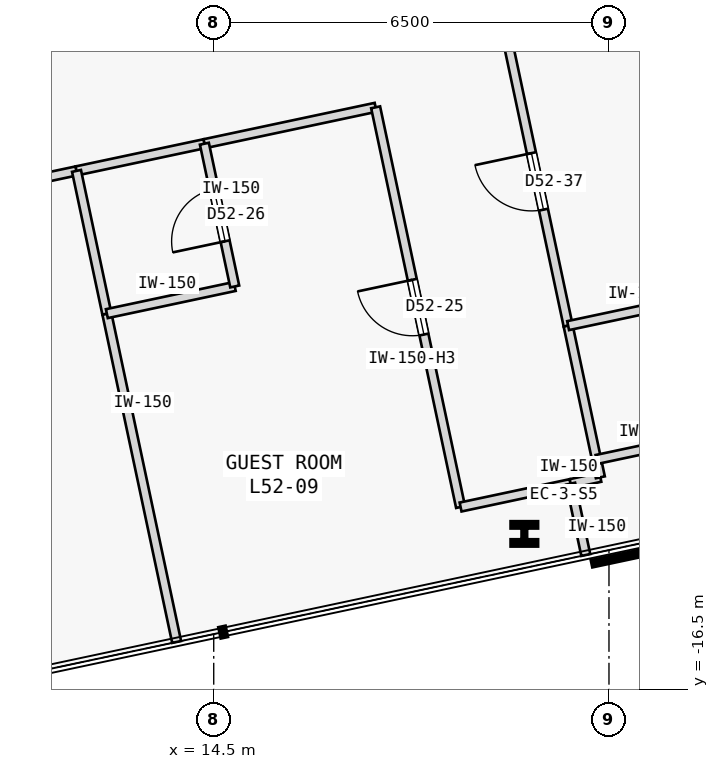
"""IFC4 building model, lengths in metres.
Left out: names, types, materials, properties, quantities, classifications, styles, units other than length and angle.
Written with IfcOpenShell. Run it as: python <this file> out.ifc"""

import sys

from ifc_helpers import new_model, si_unit, direction, frame, frame_2d, origin, origin_2d, place, context, subcontext, project, spatial, rectangle, i_section, extrude, element, fill, save


model = new_model("IFC4")
c1 = context("Model", 3, precision=1e-05, world=origin(), true_north=direction((0.0, 1.0)))
c2 = subcontext(c1, "Body", "Model", "MODEL_VIEW")
j1 = project(units=[si_unit("LENGTHUNIT", "METRE"), si_unit("PLANEANGLEUNIT", "RADIAN")], contexts=[c1])
p1 = place(None, origin())
s1 = spatial("IfcSite", under=j1, at=p1, CompositionType="ELEMENT")
p2 = place(p1, origin())
s2 = spatial("IfcBuilding", under=s1, at=p2, CompositionType="ELEMENT")
p3 = place(p2, frame((0.0, 0.0, 199.0)))
s3 = spatial("IfcBuildingStorey", under=s2, at=p3, CompositionType="ELEMENT", Elevation=199.0)
p4 = place(p3, frame((19.608, -13.94, 0.0), z_axis=(0.0, 0.0, 1.0), x_axis=(1.0, 0.0, 0.0)))
e1 = element("IfcColumn", 1, at=p4, inside=s3, PredefinedType="COLUMN", context=c2, shape_type="SweptSolid", body=[
    extrude(i_section(OverallWidth=0.409, OverallDepth=0.374, WebThickness=0.048, FlangeThickness=0.077, FilletRadius=0.015, at=origin_2d()), origin(), (0.0, 0.0, 1.0), 3.4),
])
p5 = place(p3, frame((7.618, -8.954, 0.0), z_axis=(0.0, 0.0, 1.0), x_axis=(0.978140347221, 0.207945812984, 0.0)))
e2 = element("IfcWall", 2, at=p5, inside=s3, PredefinedType="PARTITIONING", context=c2, shape_type="SweptSolid", body=[
    extrude(rectangle(XDim=4.729, YDim=0.15, at=frame_2d((2.365, 0.0))), origin(), (0.0, 0.0, 1.0), 3.0),
])
p6 = place(p5, frame((1.195, 0.0, 0.0)))
e3 = element("IfcOpeningElement", 3, at=p6, cuts=e2, PredefinedType="OPENING", context=c2, shape_type="SweptSolid", body=[
    extrude(rectangle(XDim=0.92, YDim=2.15, at=frame_2d((0.46, 1.075))), frame((0.0, 0.085, 0.0), z_axis=(0.0, -1.0, 0.0), x_axis=(1.0, 0.0, 0.0)), (0.0, 0.0, 1.0), 0.17),
])
p7 = place(p3, frame((14.346, -7.524, 0.0), z_axis=(0.0, 0.0, 1.0), x_axis=(0.97816208355, 0.207843542851, 0.0)))
e4 = element("IfcWall", 4, at=p7, inside=s3, PredefinedType="PARTITIONING", context=c2, shape_type="SweptSolid", body=[
    extrude(rectangle(XDim=2.879, YDim=0.15, at=frame_2d((1.439, 0.0))), origin(), (0.0, 0.0, 1.0), 3.0),
])
p8 = place(p3, frame((18.56, -13.498, 0.0), z_axis=(0.0, 0.0, 1.0), x_axis=(-0.207888737749, 0.978152479278, 0.0)))
e5 = element("IfcWall", 5, at=p8, inside=s3, PredefinedType="PARTITIONING", context=c2, shape_type="SweptSolid", body=[
    extrude(rectangle(XDim=6.72, YDim=0.15, at=frame_2d((3.36, 0.0))), origin(), (0.0, 0.0, 1.0), 2.22),
])
p9 = place(p8, frame((2.9, 0.0, 0.0)))
e6 = element("IfcOpeningElement", 6, at=p9, cuts=e5, PredefinedType="OPENING", context=c2, shape_type="SweptSolid", body=[
    extrude(rectangle(XDim=0.92, YDim=2.15, at=frame_2d((0.46, 1.075))), frame((0.0, 0.085, 0.0), z_axis=(0.0, -1.0, 0.0), x_axis=(1.0, 0.0, 0.0)), (0.0, 0.0, 1.0), 0.17),
])
p10 = place(p3, frame((18.56, -13.498, 0.0), z_axis=(0.0, 0.0, 1.0), x_axis=(0.978160192495, 0.207852442415, 0.0)))
e7 = element("IfcWall", 7, at=p10, inside=s3, PredefinedType="PARTITIONING", context=c2, shape_type="SweptSolid", body=[
    extrude(rectangle(XDim=1.85, YDim=0.15, at=frame_2d((0.925, 0.0))), origin(), (0.0, 0.0, 1.0), 3.0),
])
p11 = place(p3, frame((12.243, -7.971, 0.0), z_axis=(0.0, 0.0, 1.0), x_axis=(0.978146728319, 0.207915795165, 0.0)))
e8 = element("IfcWall", 8, at=p11, inside=s3, PredefinedType="PARTITIONING", context=c2, shape_type="SweptSolid", body=[
    extrude(rectangle(XDim=2.15, YDim=0.15, at=frame_2d((1.075, 0.0))), origin(), (0.0, 0.0, 1.0), 3.0),
])
p12 = place(p3, frame((20.369, -13.114, 0.0), z_axis=(0.0, 0.0, 1.0), x_axis=(0.978143962546, 0.207928806409, 0.0)))
e9 = element("IfcWall", 9, at=p12, inside=s3, PredefinedType="PARTITIONING", context=c2, shape_type="SweptSolid", body=[
    extrude(rectangle(XDim=0.5, YDim=0.15, at=frame_2d((0.25, 0.0))), origin(), (0.0, 0.0, 1.0), 3.0),
])
p13 = place(p3, frame((20.858, -13.01, 0.0), z_axis=(0.0, 0.0, 1.0), x_axis=(-0.208306395052, 0.978063620518, 0.0)))
e10 = element("IfcWall", 10, at=p13, inside=s3, PredefinedType="PARTITIONING", context=c2, shape_type="SweptSolid", body=[
    extrude(rectangle(XDim=0.3, YDim=0.15, at=frame_2d((0.15, 0.0))), origin(), (0.0, 0.0, 1.0), 3.0),
])
p14 = place(p3, frame((20.328, -10.515, 0.0), z_axis=(0.0, 0.0, 1.0), x_axis=(-0.207950868925, 0.97813927235, 0.0)))
e11 = element("IfcWall", 11, at=p14, inside=s3, PredefinedType="PARTITIONING", context=c2, shape_type="SweptSolid", body=[
    extrude(rectangle(XDim=4.85, YDim=0.15, at=frame_2d((2.425, 0.0))), origin(), (0.0, 0.0, 1.0), 3.0),
])
p15 = place(p14, frame((1.95, 0.0, 0.0)))
e12 = element("IfcOpeningElement", 12, at=p15, cuts=e11, PredefinedType="OPENING", context=c2, shape_type="SweptSolid", body=[
    extrude(rectangle(XDim=0.95, YDim=2.15, at=frame_2d((0.475, 1.075))), frame((0.0, 0.085, 0.0), z_axis=(0.0, -1.0, 0.0), x_axis=(1.0, 0.0, 0.0)), (0.0, 0.0, 1.0), 0.17),
])
p16 = place(p3, frame((20.796, -12.716, 0.0), z_axis=(0.0, 0.0, 1.0), x_axis=(-0.207891197838, 0.978151956427, 0.0)))
e13 = element("IfcWall", 13, at=p16, inside=s3, PredefinedType="PARTITIONING", context=c2, shape_type="SweptSolid", body=[
    extrude(rectangle(XDim=2.25, YDim=0.15, at=frame_2d((1.125, 0.0))), origin(), (0.0, 0.0, 1.0), 3.0),
])
p17 = place(p3, frame((13.89, -15.718, 0.0), z_axis=(0.0, 0.0, 1.0), x_axis=(-0.207873566928, 0.97815570344, 0.0)))
e14 = element("IfcWall", 14, at=p17, inside=s3, PredefinedType="PARTITIONING", context=c2, shape_type="SweptSolid", body=[
    extrude(rectangle(XDim=5.52, YDim=0.15, at=frame_2d((2.76, 0.0))), origin(), (0.0, 0.0, 1.0), 3.0),
])
p18 = place(p3, frame((12.742, -10.318, 0.0), z_axis=(0.0, 0.0, 1.0), x_axis=(-0.207917150959, 0.978146440129, 0.0)))
e15 = element("IfcWall", 15, at=p18, inside=s3, PredefinedType="PARTITIONING", context=c2, shape_type="SweptSolid", body=[
    extrude(rectangle(XDim=2.4, YDim=0.15, at=frame_2d((1.2, 0.0))), origin(), (0.0, 0.0, 1.0), 3.0),
])
p19 = place(p3, frame((12.742, -10.318, 0.0), z_axis=(0.0, 0.0, 1.0), x_axis=(0.978146728319, 0.207915795165, 0.0)))
e16 = element("IfcWall", 16, at=p19, inside=s3, PredefinedType="PARTITIONING", context=c2, shape_type="SweptSolid", body=[
    extrude(rectangle(XDim=2.15, YDim=0.15, at=frame_2d((1.075, 0.0))), origin(), (0.0, 0.0, 1.0), 3.0),
])
p20 = place(p3, frame((14.845, -9.871, 0.0), z_axis=(0.0, 0.0, 1.0), x_axis=(-0.207917150959, 0.978146440129, 0.0)))
e17 = element("IfcWall", 17, at=p20, inside=s3, PredefinedType="PARTITIONING", context=c2, shape_type="SweptSolid", body=[
    extrude(rectangle(XDim=2.4, YDim=0.15, at=frame_2d((1.2, 0.0))), origin(), (0.0, 0.0, 1.0), 3.0),
])
p21 = place(p20, frame((0.76, 0.0, 0.0)))
e18 = element("IfcOpeningElement", 18, at=p21, cuts=e17, PredefinedType="OPENING", context=c2, shape_type="SweptSolid", body=[
    extrude(rectangle(XDim=0.88, YDim=2.15, at=frame_2d((0.44, 1.075))), frame((0.0, 0.085, 0.0), z_axis=(0.0, -1.0, 0.0), x_axis=(1.0, 0.0, 0.0)), (0.0, 0.0, 1.0), 0.17),
])
p22 = place(p3, frame((20.619, -14.288, 0.0), z_axis=(0.0, 0.0, 1.0), x_axis=(-0.207917150959, 0.978146440129, 0.0)))
e19 = element("IfcWall", 19, at=p22, inside=s3, PredefinedType="PARTITIONING", context=c2, shape_type="SweptSolid", body=[
    extrude(rectangle(XDim=1.2, YDim=0.15, at=frame_2d((0.6, 0.0))), origin(), (0.0, 0.0, 1.0), 3.0),
])
for number, where, z_axis, x_axis in (
    (20, (20.796, -12.716, 0.0), (0.0, 0.0, 1.0), (0.978, 0.208, 0.0)),
    (21, (20.328, -10.515, 0.0), (0.0, 0.0, 1.0), (0.978, 0.208, 0.0)),
):
    element("IfcWall", number, at=place(p3, frame(where, z_axis=z_axis, x_axis=x_axis)), inside=s3, PredefinedType="PARTITIONING", context=c2, shape_type="SweptSolid", body=[
        extrude(rectangle(XDim=1.85, YDim=0.15, at=frame_2d((0.925, 0.0))), origin(), (0.0, 0.0, 1.0), 3.0),
    ])
p23 = place(p9, origin())
e22 = element("IfcDoor", 22, at=p23, inside=s3, OperationType="SINGLE_SWING_RIGHT", PredefinedType="DOOR", context=c2, shape_type="SweptSolid", body=[
    extrude(rectangle(XDim=0.92, YDim=2.15, at=frame_2d((0.46, 1.075))), frame((0.0, 0.025, 0.0), z_axis=(0.0, -1.0, 0.0), x_axis=(1.0, 0.0, 0.0)), (0.0, 0.0, 1.0), 0.05),
])
fill(e6, e22)
p24 = place(p21, origin())
e23 = element("IfcDoor", 23, at=p24, inside=s3, OperationType="SINGLE_SWING_LEFT", PredefinedType="DOOR", context=c2, shape_type="SweptSolid", body=[
    extrude(rectangle(XDim=0.88, YDim=2.15, at=frame_2d((0.44, 1.075))), frame((0.0, 0.025, 0.0), z_axis=(0.0, -1.0, 0.0), x_axis=(1.0, 0.0, 0.0)), (0.0, 0.0, 1.0), 0.05),
])
fill(e18, e23)
p25 = place(p15, origin())
e24 = element("IfcDoor", 24, at=p25, inside=s3, OperationType="SINGLE_SWING_RIGHT", PredefinedType="DOOR", context=c2, shape_type="SweptSolid", body=[
    extrude(rectangle(XDim=0.95, YDim=2.15, at=frame_2d((0.475, 1.075))), frame((0.0, 0.025, 0.0), z_axis=(0.0, -1.0, 0.0), x_axis=(1.0, 0.0, 0.0)), (0.0, 0.0, 1.0), 0.05),
])
fill(e12, e24)
save(model, sys.argv[1])
